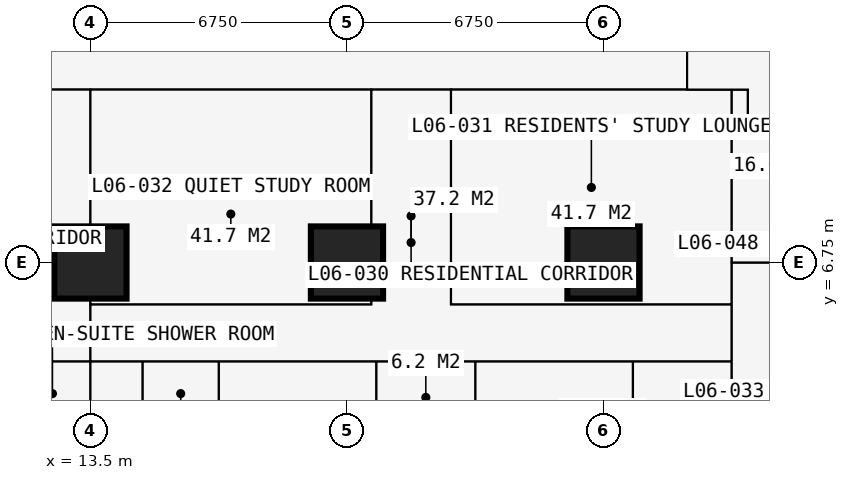
"""IFC4 building model, lengths in metres.
Left out: names, types, materials, properties, quantities, classifications, styles, units other than length and angle.
Written with IfcOpenShell. Run it as: python <this file> out.ifc"""

import sys

from ifc_helpers import new_model, si_unit, direction, frame, frame_2d, origin, origin_2d, place, context, subcontext, project, spatial, rectangle, extrude, element, fill, save


model = new_model("IFC4")
c1 = context("Model", 3, precision=1e-05, world=origin(), true_north=direction((0.0, 1.0)))
c2 = subcontext(c1, "Body", "Model", "MODEL_VIEW")
j1 = project(units=[si_unit("LENGTHUNIT", "METRE"), si_unit("PLANEANGLEUNIT", "RADIAN")], contexts=[c1])
p1 = place(None, origin())
s1 = spatial("IfcSite", under=j1, at=p1, CompositionType="ELEMENT")
p2 = place(p1, origin())
s2 = spatial("IfcBuilding", under=s1, at=p2, CompositionType="ELEMENT")
p3 = place(p2, frame((0.0, 0.0, 25.2)))
s3 = spatial("IfcBuildingStorey", under=s2, at=p3, CompositionType="ELEMENT", Elevation=25.2)
for number, where, z_axis, x_axis in (
    (1, (13.5, 6.75, 0.0), (0.0, 0.0, 1.0), (1.0, 0.0, 0.0)),
    (2, (20.25, 6.75, 0.0), (0.0, 0.0, 1.0), (1.0, 0.0, 0.0)),
    (3, (27.0, 6.75, 0.0), (0.0, 0.0, 1.0), (1.0, 0.0, 0.0)),
):
    element("IfcColumn", number, at=place(p3, frame(where, z_axis=z_axis, x_axis=x_axis)), inside=s3, PredefinedType="COLUMN", context=c2, shape_type="SweptSolid", body=[
        extrude(rectangle(XDim=1.9, YDim=1.9, at=origin_2d()), origin(), (0.0, 0.0, 1.0), 3.6),
    ])
p4 = place(p3, frame((6.75, 4.15, 0.0), z_axis=(0.0, 0.0, 1.0), x_axis=(1.0, 0.0, 0.0)))
e4 = element("IfcWall", 4, at=p4, inside=s3, PredefinedType="PARTITIONING", context=c2, shape_type="SweptSolid", body=[
    extrude(rectangle(XDim=23.625, YDim=0.15, at=frame_2d((11.812, 0.0))), origin(), (0.0, 0.0, 1.0), 3.375),
])
p5 = place(p4, frame((0.2, 0.0, 0.0)))
e5 = element("IfcOpeningElement", 5, at=p5, cuts=e4, PredefinedType="OPENING", context=c2, shape_type="SweptSolid", body=[
    extrude(rectangle(XDim=0.95, YDim=2.2, at=frame_2d((0.475, 1.1))), frame((0.0, 0.085, 0.0), z_axis=(0.0, -1.0, 0.0), x_axis=(1.0, 0.0, 0.0)), (0.0, 0.0, 1.0), 0.17),
])
p6 = place(p4, frame((3.625, 0.0, 0.0)))
e6 = element("IfcOpeningElement", 6, at=p6, cuts=e4, PredefinedType="OPENING", context=c2, shape_type="SweptSolid", body=[
    extrude(rectangle(XDim=0.95, YDim=2.2, at=frame_2d((0.475, 1.1))), frame((0.0, 0.085, 0.0), z_axis=(0.0, -1.0, 0.0), x_axis=(1.0, 0.0, 0.0)), (0.0, 0.0, 1.0), 0.17),
])
p7 = place(p4, frame((18.475, 0.0, 0.0)))
e7 = element("IfcOpeningElement", 7, at=p7, cuts=e4, PredefinedType="OPENING", context=c2, shape_type="SweptSolid", body=[
    extrude(rectangle(XDim=0.95, YDim=2.2, at=frame_2d((0.475, 1.1))), frame((0.0, 0.085, 0.0), z_axis=(0.0, -1.0, 0.0), x_axis=(1.0, 0.0, 0.0)), (0.0, 0.0, 1.0), 0.17),
])
p8 = place(p4, frame((11.725, 0.0, 0.0)))
e8 = element("IfcOpeningElement", 8, at=p8, cuts=e4, PredefinedType="OPENING", context=c2, shape_type="SweptSolid", body=[
    extrude(rectangle(XDim=0.95, YDim=2.2, at=frame_2d((0.475, 1.1))), frame((0.0, 0.085, 0.0), z_axis=(0.0, -1.0, 0.0), x_axis=(1.0, 0.0, 0.0)), (0.0, 0.0, 1.0), 0.17),
])
p9 = place(p4, frame((6.95, 0.0, 0.0)))
e9 = element("IfcOpeningElement", 9, at=p9, cuts=e4, PredefinedType="OPENING", context=c2, shape_type="SweptSolid", body=[
    extrude(rectangle(XDim=0.95, YDim=2.2, at=frame_2d((0.475, 1.1))), frame((0.0, 0.085, 0.0), z_axis=(0.0, -1.0, 0.0), x_axis=(1.0, 0.0, 0.0)), (0.0, 0.0, 1.0), 0.17),
])
p10 = place(p3, frame((10.125, 11.3, 0.0), z_axis=(0.0, 0.0, 1.0), x_axis=(1.0, 0.0, 0.0)))
e10 = element("IfcWall", 10, at=p10, inside=s3, PredefinedType="PARTITIONING", context=c2, shape_type="SweptSolid", body=[
    extrude(rectangle(XDim=20.675, YDim=0.15, at=frame_2d((10.337, 0.0))), origin(), (0.0, 0.0, 1.0), 3.375),
])
p11 = place(p10, frame((1.775, 0.0, 0.0)))
e11 = element("IfcOpeningElement", 11, at=p11, cuts=e10, PredefinedType="OPENING", context=c2, shape_type="SweptSolid", body=[
    extrude(rectangle(XDim=1.0, YDim=2.2, at=frame_2d((0.5, 1.1))), frame((0.0, 0.085, 0.0), z_axis=(0.0, -1.0, 0.0), x_axis=(1.0, 0.0, 0.0)), (0.0, 0.0, 1.0), 0.17),
])
p12 = place(p10, frame((11.312, 0.0, 0.0)))
e12 = element("IfcOpeningElement", 12, at=p12, cuts=e10, PredefinedType="OPENING", context=c2, shape_type="SweptSolid", body=[
    extrude(rectangle(XDim=1.0, YDim=2.2, at=frame_2d((0.5, 1.1))), frame((0.0, 0.085, 0.0), z_axis=(0.0, -1.0, 0.0), x_axis=(1.0, 0.0, 0.0)), (0.0, 0.0, 1.0), 0.17),
])
p13 = place(p3, frame((13.5, -0.734, 0.0), z_axis=(0.0, 0.0, 1.0), x_axis=(0.0, 1.0, 0.0)))
e13 = element("IfcWall", 13, at=p13, inside=s3, PredefinedType="PARTITIONING", context=c2, shape_type="SweptSolid", body=[
    extrude(rectangle(XDim=12.034, YDim=0.15, at=frame_2d((6.017, 0.0))), origin(), (0.0, 0.0, 1.0), 2.877),
])
p14 = place(p3, frame((13.5, 5.65, 0.0), z_axis=(0.0, 0.0, 1.0), x_axis=(1.0, 0.0, 0.0)))
e14 = element("IfcWall", 14, at=p14, inside=s3, PredefinedType="PARTITIONING", context=c2, shape_type="SweptSolid", body=[
    extrude(rectangle(XDim=7.387, YDim=0.15, at=frame_2d((3.694, 0.0))), origin(), (0.0, 0.0, 1.0), 3.375),
])
p15 = place(p14, frame((3.2, 0.0, 0.0)))
e15 = element("IfcOpeningElement", 15, at=p15, cuts=e14, PredefinedType="OPENING", context=c2, shape_type="SweptSolid", body=[
    extrude(rectangle(XDim=0.95, YDim=2.2, at=frame_2d((0.475, 1.1))), frame((0.0, 0.085, 0.0), z_axis=(0.0, -1.0, 0.0), x_axis=(1.0, 0.0, 0.0)), (0.0, 0.0, 1.0), 0.17),
])
p16 = place(p3, frame((14.875, 1.95, 0.0), z_axis=(0.0, 0.0, 1.0), x_axis=(0.0, 1.0, 0.0)))
e16 = element("IfcWall", 16, at=p16, inside=s3, PredefinedType="PARTITIONING", context=c2, shape_type="SweptSolid", body=[
    extrude(rectangle(XDim=2.2, YDim=0.1, at=frame_2d((1.1, 0.0))), origin(), (0.0, 0.0, 1.0), 3.375),
])
p17 = place(p3, frame((16.875, -0.734, 0.0), z_axis=(0.0, 0.0, 1.0), x_axis=(0.0, 1.0, 0.0)))
e17 = element("IfcWall", 17, at=p17, inside=s3, PredefinedType="PARTITIONING", context=c2, shape_type="SweptSolid", body=[
    extrude(rectangle(XDim=4.884, YDim=0.175, at=frame_2d((2.442, 0.0))), origin(), (0.0, 0.0, 1.0), 3.375),
])
p18 = place(p17, frame((3.334, 0.0, 0.0)))
e18 = element("IfcOpeningElement", 18, at=p18, cuts=e17, PredefinedType="OPENING", context=c2, shape_type="SweptSolid", body=[
    extrude(rectangle(XDim=0.9, YDim=2.2, at=frame_2d((0.45, 1.1))), frame((0.0, 0.097, 0.0), z_axis=(0.0, -1.0, 0.0), x_axis=(1.0, 0.0, 0.0)), (0.0, 0.0, 1.0), 0.195),
])
p19 = place(p3, frame((20.887, 5.65, 0.0), z_axis=(0.0, 0.0, 1.0), x_axis=(0.0, 1.0, 0.0)))
e19 = element("IfcWall", 19, at=p19, inside=s3, PredefinedType="PARTITIONING", context=c2, shape_type="SweptSolid", body=[
    extrude(rectangle(XDim=5.65, YDim=0.15, at=frame_2d((2.825, 0.0))), origin(), (0.0, 0.0, 1.0), 3.375),
])
p20 = place(p3, frame((21.025, 1.75, 0.0), z_axis=(0.0, 0.0, 1.0), x_axis=(0.0, 1.0, 0.0)))
e20 = element("IfcWall", 20, at=p20, inside=s3, PredefinedType="PARTITIONING", context=c2, shape_type="SweptSolid", body=[
    extrude(rectangle(XDim=2.4, YDim=0.1, at=frame_2d((1.2, 0.0))), origin(), (0.0, 0.0, 1.0), 3.375),
])
p21 = place(p3, frame((22.988, 5.65, 0.0), z_axis=(0.0, 0.0, 1.0), x_axis=(1.0, 0.0, 0.0)))
e21 = element("IfcWall", 21, at=p21, inside=s3, PredefinedType="PARTITIONING", context=c2, shape_type="SweptSolid", body=[
    extrude(rectangle(XDim=7.387, YDim=0.15, at=frame_2d((3.694, 0.0))), origin(), (0.0, 0.0, 1.0), 3.375),
])
p22 = place(p21, frame((2.1, 0.0, 0.0)))
e22 = element("IfcOpeningElement", 22, at=p22, cuts=e21, PredefinedType="OPENING", context=c2, shape_type="SweptSolid", body=[
    extrude(rectangle(XDim=0.95, YDim=2.2, at=frame_2d((0.475, 1.1))), frame((0.0, 0.085, 0.0), z_axis=(0.0, -1.0, 0.0), x_axis=(1.0, 0.0, 0.0)), (0.0, 0.0, 1.0), 0.17),
])
p23 = place(p3, frame((22.988, 5.65, 0.0), z_axis=(0.0, 0.0, 1.0), x_axis=(0.0, 1.0, 0.0)))
e23 = element("IfcWall", 23, at=p23, inside=s3, PredefinedType="PARTITIONING", context=c2, shape_type="SweptSolid", body=[
    extrude(rectangle(XDim=5.65, YDim=0.15, at=frame_2d((2.825, 0.0))), origin(), (0.0, 0.0, 1.0), 3.375),
])
p24 = place(p3, frame((23.625, -0.734, 0.0), z_axis=(0.0, 0.0, 1.0), x_axis=(0.0, 1.0, 0.0)))
e24 = element("IfcWall", 24, at=p24, inside=s3, PredefinedType="PARTITIONING", context=c2, shape_type="SweptSolid", body=[
    extrude(rectangle(XDim=4.884, YDim=0.175, at=frame_2d((2.442, 0.0))), origin(), (0.0, 0.0, 1.0), 3.375),
])
p25 = place(p24, frame((3.234, 0.0, 0.0)))
e25 = element("IfcOpeningElement", 25, at=p25, cuts=e24, PredefinedType="OPENING", context=c2, shape_type="SweptSolid", body=[
    extrude(rectangle(XDim=0.9, YDim=2.2, at=frame_2d((0.45, 1.1))), frame((0.0, 0.097, 0.0), z_axis=(0.0, -1.0, 0.0), x_axis=(1.0, 0.0, 0.0)), (0.0, 0.0, 1.0), 0.195),
])
p26 = place(p3, frame((27.775, 1.75, 0.0), z_axis=(0.0, 0.0, 1.0), x_axis=(0.0, 1.0, 0.0)))
e26 = element("IfcWall", 26, at=p26, inside=s3, PredefinedType="PARTITIONING", context=c2, shape_type="SweptSolid", body=[
    extrude(rectangle(XDim=2.4, YDim=0.1, at=frame_2d((1.2, 0.0))), origin(), (0.0, 0.0, 1.0), 3.375),
])
p27 = place(p3, frame((29.2, 11.3, 0.0), z_axis=(0.0, 0.0, 1.0), x_axis=(0.0, 1.0, 0.0)))
e27 = element("IfcWall", 27, at=p27, inside=s3, PredefinedType="PARTITIONING", context=c2, shape_type="SweptSolid", body=[
    extrude(rectangle(XDim=17.9, YDim=0.2, at=frame_2d((8.95, 0.0))), origin(), (0.0, 0.0, 1.0), 3.375),
])
p28 = place(p27, frame((8.35, 0.0, 0.0)))
e28 = element("IfcOpeningElement", 28, at=p28, cuts=e27, PredefinedType="OPENING", context=c2, shape_type="SweptSolid", body=[
    extrude(rectangle(XDim=1.2, YDim=2.2, at=frame_2d((0.6, 1.1))), frame((0.0, 0.11, 0.0), z_axis=(0.0, -1.0, 0.0), x_axis=(1.0, 0.0, 0.0)), (0.0, 0.0, 1.0), 0.22),
])
p29 = place(p3, frame((30.375, -0.734, 0.0), z_axis=(0.0, 0.0, 1.0), x_axis=(0.0, 1.0, 0.0)))
e29 = element("IfcWall", 29, at=p29, inside=s3, PredefinedType="PARTITIONING", context=c2, shape_type="SweptSolid", body=[
    extrude(rectangle(XDim=12.034, YDim=0.15, at=frame_2d((6.017, 0.0))), origin(), (0.0, 0.0, 1.0), 3.375),
])
p30 = place(p29, frame((5.134, 0.0, 0.0)))
e30 = element("IfcOpeningElement", 30, at=p30, cuts=e29, PredefinedType="OPENING", context=c2, shape_type="SweptSolid", body=[
    extrude(rectangle(XDim=1.0, YDim=2.2, at=frame_2d((0.5, 1.1))), frame((0.0, 0.085, 0.0), z_axis=(0.0, -1.0, 0.0), x_axis=(1.0, 0.0, 0.0)), (0.0, 0.0, 1.0), 0.17),
])
p31 = place(p3, frame((30.375, 6.75, 0.0), z_axis=(0.0, 0.0, 1.0), x_axis=(1.0, 0.0, 0.0)))
e31 = element("IfcWall", 31, at=p31, inside=s3, PredefinedType="PARTITIONING", context=c2, shape_type="SweptSolid", body=[
    extrude(rectangle(XDim=5.975, YDim=0.15, at=frame_2d((2.988, 0.0))), origin(), (0.0, 0.0, 1.0), 2.877),
])
p32 = place(p3, frame((30.375, 10.45, 0.0), z_axis=(0.0, 0.0, 1.0), x_axis=(1.0, 0.0, 0.0)))
e32 = element("IfcWall", 32, at=p32, inside=s3, PredefinedType="PARTITIONING", context=c2, shape_type="SweptSolid", body=[
    extrude(rectangle(XDim=4.475, YDim=0.15, at=frame_2d((2.238, 0.0))), origin(), (0.0, 0.0, 1.0), 3.375),
])
p33 = place(p32, frame((2.35, 0.0, 0.0)))
e33 = element("IfcOpeningElement", 33, at=p33, cuts=e32, PredefinedType="OPENING", context=c2, shape_type="SweptSolid", body=[
    extrude(rectangle(XDim=0.95, YDim=2.2, at=frame_2d((0.475, 1.1))), frame((0.0, 0.085, 0.0), z_axis=(0.0, -1.0, 0.0), x_axis=(1.0, 0.0, 0.0)), (0.0, 0.0, 1.0), 0.17),
])
p34 = place(p3, frame((30.8, 10.6, 0.0), z_axis=(0.0, 0.0, 1.0), x_axis=(0.0, 1.0, 0.0)))
e34 = element("IfcWall", 34, at=p34, inside=s3, PredefinedType="PARTITIONING", context=c2, shape_type="SweptSolid", body=[
    extrude(rectangle(XDim=0.7, YDim=0.15, at=frame_2d((0.35, 0.0))), origin(), (0.0, 0.0, 1.0), 3.375),
])
p35 = place(p3, frame((30.8, 10.6, 0.0), z_axis=(0.0, 0.0, 1.0), x_axis=(1.0, 0.0, 0.0)))
e35 = element("IfcWall", 35, at=p35, inside=s3, PredefinedType="PARTITIONING", context=c2, shape_type="SweptSolid", body=[
    extrude(rectangle(XDim=1.85, YDim=0.15, at=frame_2d((0.925, 0.0))), origin(), (0.0, 0.0, 1.0), 3.375),
])
p36 = place(p11, origin())
e36 = element("IfcDoor", 36, at=p36, inside=s3, OperationType="SINGLE_SWING_LEFT", PredefinedType="DOOR", context=c2, shape_type="SweptSolid", body=[
    extrude(rectangle(XDim=1.0, YDim=2.2, at=frame_2d((0.5, 1.1))), frame((0.0, 0.025, 0.0), z_axis=(0.0, -1.0, 0.0), x_axis=(1.0, 0.0, 0.0)), (0.0, 0.0, 1.0), 0.05),
])
fill(e11, e36)
p37 = place(p7, origin())
e37 = element("IfcDoor", 37, at=p37, inside=s3, OperationType="SINGLE_SWING_LEFT", PredefinedType="DOOR", context=c2, shape_type="SweptSolid", body=[
    extrude(rectangle(XDim=0.95, YDim=2.2, at=frame_2d((0.475, 1.1))), frame((0.0, 0.025, 0.0), z_axis=(0.0, -1.0, 0.0), x_axis=(1.0, 0.0, 0.0)), (0.0, 0.0, 1.0), 0.05),
])
fill(e7, e37)
p38 = place(p8, origin())
e38 = element("IfcDoor", 38, at=p38, inside=s3, OperationType="SINGLE_SWING_LEFT", PredefinedType="DOOR", context=c2, shape_type="SweptSolid", body=[
    extrude(rectangle(XDim=0.95, YDim=2.2, at=frame_2d((0.475, 1.1))), frame((0.0, 0.025, 0.0), z_axis=(0.0, -1.0, 0.0), x_axis=(1.0, 0.0, 0.0)), (0.0, 0.0, 1.0), 0.05),
])
fill(e8, e38)
p39 = place(p25, origin())
e39 = element("IfcDoor", 39, at=p39, inside=s3, OperationType="SINGLE_SWING_RIGHT", PredefinedType="DOOR", context=c2, shape_type="SweptSolid", body=[
    extrude(rectangle(XDim=0.9, YDim=2.2, at=frame_2d((0.45, 1.1))), frame((0.0, 0.025, 0.0), z_axis=(0.0, -1.0, 0.0), x_axis=(1.0, 0.0, 0.0)), (0.0, 0.0, 1.0), 0.05),
])
fill(e25, e39)
p40 = place(p9, origin())
e40 = element("IfcDoor", 40, at=p40, inside=s3, OperationType="SINGLE_SWING_LEFT", PredefinedType="DOOR", context=c2, shape_type="SweptSolid", body=[
    extrude(rectangle(XDim=0.95, YDim=2.2, at=frame_2d((0.475, 1.1))), frame((0.0, 0.025, 0.0), z_axis=(0.0, -1.0, 0.0), x_axis=(1.0, 0.0, 0.0)), (0.0, 0.0, 1.0), 0.05),
])
fill(e9, e40)
p41 = place(p18, origin())
e41 = element("IfcDoor", 41, at=p41, inside=s3, OperationType="SINGLE_SWING_RIGHT", PredefinedType="DOOR", context=c2, shape_type="SweptSolid", body=[
    extrude(rectangle(XDim=0.9, YDim=2.2, at=frame_2d((0.45, 1.1))), frame((0.0, 0.025, 0.0), z_axis=(0.0, -1.0, 0.0), x_axis=(1.0, 0.0, 0.0)), (0.0, 0.0, 1.0), 0.05),
])
fill(e18, e41)
p42 = place(p12, origin())
e42 = element("IfcDoor", 42, at=p42, inside=s3, OperationType="SINGLE_SWING_LEFT", PredefinedType="DOOR", context=c2, shape_type="SweptSolid", body=[
    extrude(rectangle(XDim=1.0, YDim=2.2, at=frame_2d((0.5, 1.1))), frame((0.0, 0.025, 0.0), z_axis=(0.0, -1.0, 0.0), x_axis=(1.0, 0.0, 0.0)), (0.0, 0.0, 1.0), 0.05),
])
fill(e12, e42)
p43 = place(p22, origin())
e43 = element("IfcDoor", 43, at=p43, inside=s3, OperationType="SINGLE_SWING_LEFT", PredefinedType="DOOR", context=c2, shape_type="SweptSolid", body=[
    extrude(rectangle(XDim=0.95, YDim=2.2, at=frame_2d((0.475, 1.1))), frame((0.0, 0.025, 0.0), z_axis=(0.0, -1.0, 0.0), x_axis=(1.0, 0.0, 0.0)), (0.0, 0.0, 1.0), 0.05),
])
fill(e22, e43)
p44 = place(p15, origin())
e44 = element("IfcDoor", 44, at=p44, inside=s3, OperationType="SINGLE_SWING_LEFT", PredefinedType="DOOR", context=c2, shape_type="SweptSolid", body=[
    extrude(rectangle(XDim=0.95, YDim=2.2, at=frame_2d((0.475, 1.1))), frame((0.0, 0.025, 0.0), z_axis=(0.0, -1.0, 0.0), x_axis=(1.0, 0.0, 0.0)), (0.0, 0.0, 1.0), 0.05),
])
fill(e15, e44)
p45 = place(p30, origin())
e45 = element("IfcDoor", 45, at=p45, inside=s3, OperationType="SINGLE_SWING_LEFT", PredefinedType="DOOR", context=c2, shape_type="SweptSolid", body=[
    extrude(rectangle(XDim=1.0, YDim=2.2, at=frame_2d((0.5, 1.1))), frame((0.0, 0.025, 0.0), z_axis=(0.0, -1.0, 0.0), x_axis=(1.0, 0.0, 0.0)), (0.0, 0.0, 1.0), 0.05),
])
fill(e30, e45)
save(model, sys.argv[1])
